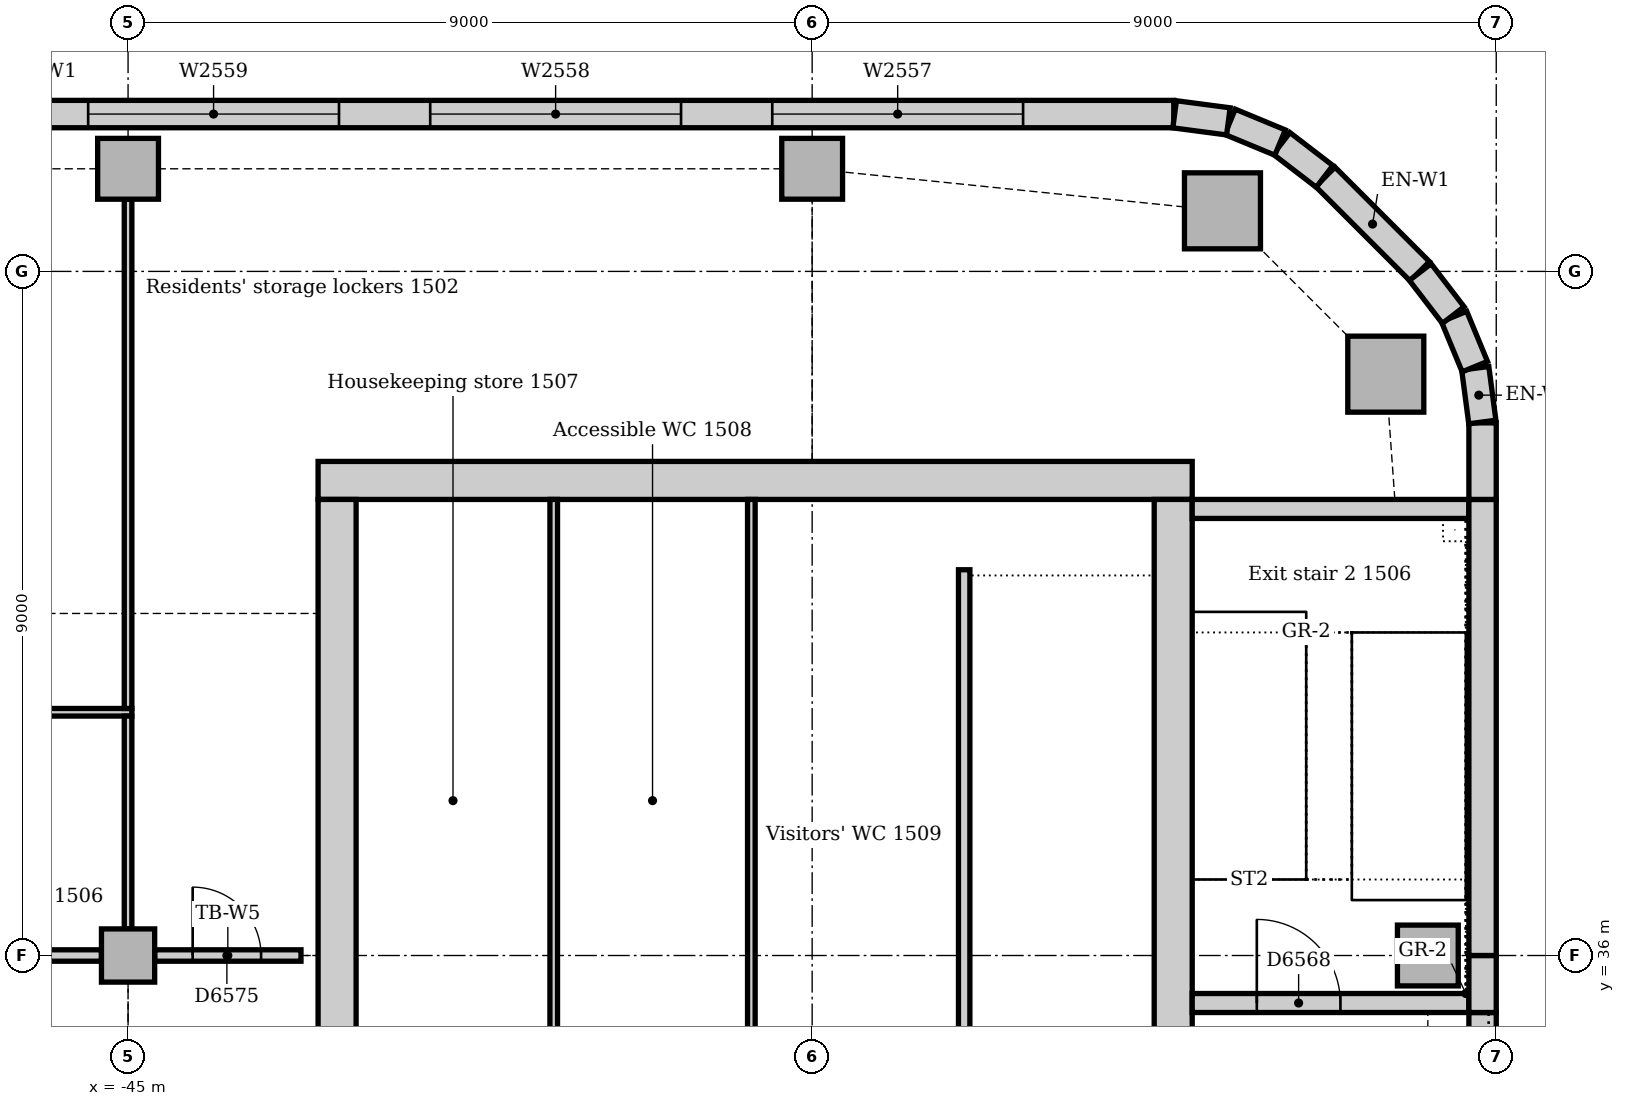
"""IFC4 building model, lengths in metres.
Left out: names, types, materials, properties, quantities, classifications, styles, units other than length and angle.
Written with IfcOpenShell. Run it as: python <this file> out.ifc"""

import sys

from ifc_helpers import new_model, si_unit, direction, frame, frame_2d, origin, origin_2d, place, context, subcontext, project, spatial, rectangle, extrude, element, fill, save


model = new_model("IFC4")
c1 = context("Model", 3, precision=1e-05, world=origin(), true_north=direction((0.0, 1.0)))
c2 = subcontext(c1, "Body", "Model", "MODEL_VIEW")
j1 = project(units=[si_unit("LENGTHUNIT", "METRE"), si_unit("PLANEANGLEUNIT", "RADIAN")], contexts=[c1])
p1 = place(None, origin())
s1 = spatial("IfcSite", under=j1, at=p1, CompositionType="ELEMENT")
p2 = place(p1, origin())
s2 = spatial("IfcBuilding", under=s1, at=p2, CompositionType="ELEMENT")
p3 = place(p2, frame((0.0, 0.0, 67.0)))
s3 = spatial("IfcBuildingStorey", under=s2, at=p3, CompositionType="ELEMENT", Elevation=67.0)
p4 = place(p3, frame((-31.0, 42.25, 0.0), z_axis=(0.0, 0.0, 1.0), x_axis=(-1.0, 0.0, 0.0)))
e1 = element("IfcWall", 1, at=p4, inside=s3, PredefinedType="SOLIDWALL", context=c2, shape_type="SweptSolid", body=[
    extrude(rectangle(XDim=11.5, YDim=0.5, at=frame_2d((5.75, 0.0))), origin(), (0.0, 0.0, 1.0), 4.0),
])
p5 = place(p3, frame((-31.25, 30.5, 0.0), z_axis=(0.0, 0.0, 1.0), x_axis=(0.0, 1.0, 0.0)))
e2 = element("IfcWall", 2, at=p5, inside=s3, PredefinedType="SOLIDWALL", context=c2, shape_type="SweptSolid", body=[
    extrude(rectangle(XDim=11.5, YDim=0.5, at=frame_2d((5.75, 0.0))), origin(), (0.0, 0.0, 1.0), 4.0),
])
p6 = place(p5, frame((0.85, 0.0, 0.0)))
e3 = element("IfcOpeningElement", 3, at=p6, cuts=e2, PredefinedType="OPENING", context=c2, shape_type="SweptSolid", body=[
    extrude(rectangle(XDim=1.8, YDim=2.1, at=frame_2d((0.9, 1.05))), frame((0.0, 0.26, 0.0), z_axis=(0.0, -1.0, 0.0), x_axis=(1.0, 0.0, 0.0)), (0.0, 0.0, 1.0), 0.52),
])
p7 = place(p3, frame((-42.25, 42.0, 0.0), z_axis=(0.0, 0.0, 1.0), x_axis=(0.0, -1.0, 0.0)))
e4 = element("IfcWall", 4, at=p7, inside=s3, PredefinedType="SOLIDWALL", context=c2, shape_type="SweptSolid", body=[
    extrude(rectangle(XDim=11.5, YDim=0.5, at=frame_2d((5.75, 0.0))), origin(), (0.0, 0.0, 1.0), 4.0),
])
p8 = place(p7, frame((8.85, 0.0, 0.0)))
e5 = element("IfcOpeningElement", 5, at=p8, cuts=e4, PredefinedType="OPENING", context=c2, shape_type="SweptSolid", body=[
    extrude(rectangle(XDim=1.8, YDim=2.1, at=frame_2d((0.9, 1.05))), frame((0.0, 0.26, 0.0), z_axis=(0.0, -1.0, 0.0), x_axis=(1.0, 0.0, 0.0)), (0.0, 0.0, 1.0), 0.52),
])
p9 = place(p3, frame((-31.0, 35.375, 0.0), z_axis=(0.0, 0.0, 1.0), x_axis=(1.0, 0.0, 0.0)))
e6 = element("IfcWall", 6, at=p9, inside=s3, PredefinedType="SOLIDWALL", context=c2, shape_type="SweptSolid", body=[
    extrude(rectangle(XDim=3.64, YDim=0.25, at=frame_2d((1.82, 0.0))), origin(), (0.0, 0.0, 1.0), 4.0),
])
p10 = place(p9, frame((0.85, 0.0, 0.0)))
e7 = element("IfcOpeningElement", 7, at=p10, cuts=e6, PredefinedType="OPENING", context=c2, shape_type="SweptSolid", body=[
    extrude(rectangle(XDim=1.1, YDim=2.1, at=frame_2d((0.55, 1.05))), frame((0.0, 0.135, 0.0), z_axis=(0.0, -1.0, 0.0), x_axis=(1.0, 0.0, 0.0)), (0.0, 0.0, 1.0), 0.27),
])
p11 = place(p3, frame((-27.36, 41.875, 0.0), z_axis=(0.0, 0.0, 1.0), x_axis=(-1.0, 0.0, 0.0)))
e8 = element("IfcWall", 8, at=p11, inside=s3, PredefinedType="SOLIDWALL", context=c2, shape_type="SweptSolid", body=[
    extrude(rectangle(XDim=3.64, YDim=0.25, at=frame_2d((1.82, 0.0))), origin(), (0.0, 0.0, 1.0), 4.0),
])
for number, where, z_axis, x_axis in (
    (9, (-28.453, 43.648, 0.0), (0.0, 0.0, 1.0), (1.0, 0.0, 0.0)),
    (10, (-30.602, 45.797, 0.0), (0.0, 0.0, 1.0), (1.0, 0.0, 0.0)),
):
    element("IfcColumn", number, at=place(p3, frame(where, z_axis=z_axis, x_axis=x_axis)), inside=s3, PredefinedType="COLUMN", context=c2, shape_type="SweptSolid", body=[
        extrude(rectangle(XDim=1.0, YDim=1.0, at=origin_2d()), origin(), (0.0, 0.0, 1.0), 3.85),
    ])
p12 = place(p3, frame((-27.9, 36.0, 0.0), z_axis=(0.0, 0.0, 1.0), x_axis=(1.0, 0.0, 0.0)))
e11 = element("IfcColumn", 11, at=p12, inside=s3, PredefinedType="COLUMN", context=c2, shape_type="SweptSolid", body=[
    extrude(rectangle(XDim=0.8, YDim=0.8, at=origin_2d()), origin(), (0.0, 0.0, 1.0), 4.0),
])
for number, where, z_axis, x_axis in (
    (12, (-45.0, 46.35, 0.0), (0.0, 0.0, 1.0), (1.0, 0.0, 0.0)),
    (13, (-36.0, 46.35, 0.0), (0.0, 0.0, 1.0), (1.0, 0.0, 0.0)),
):
    element("IfcColumn", number, at=place(p3, frame(where, z_axis=z_axis, x_axis=x_axis)), inside=s3, PredefinedType="COLUMN", context=c2, shape_type="SweptSolid", body=[
        extrude(rectangle(XDim=0.8, YDim=0.8, at=origin_2d()), origin(), (0.0, 0.0, 1.0), 3.85),
    ])
p13 = place(p3, frame((-45.0, 36.0, 0.0), z_axis=(0.0, 0.0, 1.0), x_axis=(1.0, 0.0, 0.0)))
e14 = element("IfcColumn", 14, at=p13, inside=s3, PredefinedType="COLUMN", context=c2, shape_type="SweptSolid", body=[
    extrude(rectangle(XDim=0.7, YDim=0.7, at=origin_2d()), origin(), (0.0, 0.0, 1.0), 3.85),
])
p14 = place(p3, frame((-27.18, 27.75, 0.0), z_axis=(0.0, 0.0, 1.0), x_axis=(0.0, 1.0, 0.0)))
e15 = element("IfcWall", 15, at=p14, inside=s3, PredefinedType="STANDARD", context=c2, shape_type="SweptSolid", body=[
    extrude(rectangle(XDim=7.5, YDim=0.36, at=frame_2d((3.75, 0.0))), origin(), (0.0, 0.0, 1.0), 3.436),
])
p15 = place(p14, frame((2.85, 0.0, 1.2)))
e16 = element("IfcOpeningElement", 16, at=p15, cuts=e15, PredefinedType="OPENING", context=c2, shape_type="SweptSolid", body=[
    extrude(rectangle(XDim=1.8, YDim=1.2, at=frame_2d((0.9, 0.6))), frame((0.0, 0.19, 0.0), z_axis=(0.0, -1.0, 0.0), x_axis=(1.0, 0.0, 0.0)), (0.0, 0.0, 1.0), 0.38),
])
p16 = place(p3, frame((-27.18, 35.25, 0.0), z_axis=(0.0, 0.0, 1.0), x_axis=(0.0, 1.0, 0.0)))
e17 = element("IfcWall", 17, at=p16, inside=s3, PredefinedType="STANDARD", context=c2, shape_type="SweptSolid", body=[
    extrude(rectangle(XDim=0.75, YDim=0.36, at=frame_2d((0.375, 0.0))), origin(), (0.0, 0.0, 1.0), 3.436),
])
p17 = place(p3, frame((-27.18, 36.0, 0.0), z_axis=(0.0, 0.0, 1.0), x_axis=(0.0, 1.0, 0.0)))
e18 = element("IfcWall", 18, at=p17, inside=s3, PredefinedType="STANDARD", context=c2, shape_type="SweptSolid", body=[
    extrude(rectangle(XDim=6.0, YDim=0.36, at=frame_2d((3.0, 0.0))), origin(), (0.0, 0.0, 1.0), 3.85),
])
p18 = place(p3, frame((-27.18, 42.0, 0.0), z_axis=(0.0, 0.0, 1.0), x_axis=(0.0, 1.0, 0.0)))
e19 = element("IfcWall", 19, at=p18, inside=s3, PredefinedType="STANDARD", context=c2, shape_type="SweptSolid", body=[
    extrude(rectangle(XDim=1.007, YDim=0.36, at=frame_2d((0.504, 0.0))), origin(), (0.0, 0.0, 1.0), 3.85),
])
p19 = place(p3, frame((-28.006, 45.001, 0.0), z_axis=(0.0, 0.0, 1.0), x_axis=(-0.707106781187, 0.707106781187, 0.0)))
e20 = element("IfcWall", 20, at=p19, inside=s3, PredefinedType="STANDARD", context=c2, shape_type="SweptSolid", body=[
    extrude(rectangle(XDim=1.757, YDim=0.36, at=frame_2d((0.879, 0.0))), origin(), (0.0, 0.0, 1.0), 3.85),
])
p20 = place(p3, frame((-31.243, 47.07, 0.0), z_axis=(0.0, 0.0, 1.0), x_axis=(-1.0, 0.0, 0.0)))
e21 = element("IfcWall", 21, at=p20, inside=s3, PredefinedType="STANDARD", context=c2, shape_type="SweptSolid", body=[
    extrude(rectangle(XDim=29.765, YDim=0.36, at=frame_2d((14.882, 0.0))), origin(), (0.0, 0.0, 1.0), 3.85),
])
p21 = place(p20, frame((1.982, 0.0, 0.9)))
e22 = element("IfcOpeningElement", 22, at=p21, cuts=e21, PredefinedType="OPENING", context=c2, shape_type="SweptSolid", body=[
    extrude(rectangle(XDim=3.3, YDim=1.6, at=frame_2d((1.65, 0.8))), frame((0.0, 0.19, 0.0), z_axis=(0.0, -1.0, 0.0), x_axis=(1.0, 0.0, 0.0)), (0.0, 0.0, 1.0), 0.38),
])
p22 = place(p20, frame((6.482, 0.0, 0.9)))
e23 = element("IfcOpeningElement", 23, at=p22, cuts=e21, PredefinedType="OPENING", context=c2, shape_type="SweptSolid", body=[
    extrude(rectangle(XDim=3.3, YDim=1.6, at=frame_2d((1.65, 0.8))), frame((0.0, 0.19, 0.0), z_axis=(0.0, -1.0, 0.0), x_axis=(1.0, 0.0, 0.0)), (0.0, 0.0, 1.0), 0.38),
])
p23 = place(p20, frame((10.982, 0.0, 0.9)))
e24 = element("IfcOpeningElement", 24, at=p23, cuts=e21, PredefinedType="OPENING", context=c2, shape_type="SweptSolid", body=[
    extrude(rectangle(XDim=3.3, YDim=1.6, at=frame_2d((1.65, 0.8))), frame((0.0, 0.19, 0.0), z_axis=(0.0, -1.0, 0.0), x_axis=(1.0, 0.0, 0.0)), (0.0, 0.0, 1.0), 0.38),
])
p24 = place(p20, frame((15.482, 0.0, 0.9)))
e25 = element("IfcOpeningElement", 25, at=p24, cuts=e21, PredefinedType="OPENING", context=c2, shape_type="SweptSolid", body=[
    extrude(rectangle(XDim=3.3, YDim=1.6, at=frame_2d((1.65, 0.8))), frame((0.0, 0.19, 0.0), z_axis=(0.0, -1.0, 0.0), x_axis=(1.0, 0.0, 0.0)), (0.0, 0.0, 1.0), 0.38),
])
p25 = place(p20, frame((19.982, 0.0, 0.9)))
e26 = element("IfcOpeningElement", 26, at=p25, cuts=e21, PredefinedType="OPENING", context=c2, shape_type="SweptSolid", body=[
    extrude(rectangle(XDim=3.3, YDim=1.6, at=frame_2d((1.65, 0.8))), frame((0.0, 0.19, 0.0), z_axis=(0.0, -1.0, 0.0), x_axis=(1.0, 0.0, 0.0)), (0.0, 0.0, 1.0), 0.38),
])
p26 = place(p20, frame((24.482, 0.0, 0.9)))
e27 = element("IfcOpeningElement", 27, at=p26, cuts=e21, PredefinedType="OPENING", context=c2, shape_type="SweptSolid", body=[
    extrude(rectangle(XDim=3.3, YDim=1.6, at=frame_2d((1.65, 0.8))), frame((0.0, 0.19, 0.0), z_axis=(0.0, -1.0, 0.0), x_axis=(1.0, 0.0, 0.0)), (0.0, 0.0, 1.0), 0.38),
])
for number, where, z_axis, x_axis in (
    (28, (-27.183, 43.019, 0.0), (0.0, 0.0, 1.0), (-0.131, 0.991, 0.0)),
    (29, (-27.282, 43.747, 0.0), (0.0, 0.0, 1.0), (-0.383, 0.924, 0.0)),
):
    element("IfcWall", number, at=place(p3, frame(where, z_axis=z_axis, x_axis=x_axis)), inside=s3, PredefinedType="STANDARD", context=c2, shape_type="SweptSolid", body=[
        extrude(rectangle(XDim=0.713, YDim=0.36, at=frame_2d((0.356, 0.0))), origin(), (0.0, 0.0, 1.0), 3.85),
    ])
for number, where, z_axis, x_axis in (
    (30, (-27.566, 44.425, 0.0), (0.0, 0.0, 1.0), (-0.609, 0.793, 0.0)),
    (31, (-29.259, 46.25, 0.0), (0.0, 0.0, 1.0), (-0.793, 0.609, 0.0)),
):
    element("IfcWall", number, at=place(p3, frame(where, z_axis=z_axis, x_axis=x_axis)), inside=s3, PredefinedType="STANDARD", context=c2, shape_type="SweptSolid", body=[
        extrude(rectangle(XDim=0.713, YDim=0.36, at=frame_2d((0.357, 0.0))), origin(), (0.0, 0.0, 1.0), 3.85),
    ])
for number, where, z_axis, x_axis in (
    (32, (-29.844, 46.695, 0.0), (0.0, 0.0, 1.0), (-0.924, 0.383, 0.0)),
    (33, (-30.524, 46.974, 0.0), (0.0, 0.0, 1.0), (-0.991, 0.131, 0.0)),
):
    element("IfcWall", number, at=place(p3, frame(where, z_axis=z_axis, x_axis=x_axis)), inside=s3, PredefinedType="STANDARD", context=c2, shape_type="SweptSolid", body=[
        extrude(rectangle(XDim=0.713, YDim=0.36, at=frame_2d((0.356, 0.0))), origin(), (0.0, 0.0, 1.0), 3.85),
    ])
p27 = place(p3, frame((-34.0, 41.075, 0.0), z_axis=(0.0, 0.0, 1.0), x_axis=(0.0, -1.0, 0.0)))
e34 = element("IfcWall", 34, at=p27, inside=s3, PredefinedType="SOLIDWALL", context=c2, shape_type="SweptSolid", body=[
    extrude(rectangle(XDim=7.0, YDim=0.15, at=frame_2d((3.5, 0.0))), origin(), (0.0, 0.0, 1.0), 4.0),
])
for number, where, z_axis, x_axis in (
    (35, (-39.4, 34.075, 0.0), (0.0, 0.0, 1.0), (0.0, 1.0, 0.0)),
    (36, (-36.8, 34.075, 0.0), (0.0, 0.0, 1.0), (0.0, 1.0, 0.0)),
):
    element("IfcWall", number, at=place(p3, frame(where, z_axis=z_axis, x_axis=x_axis)), inside=s3, PredefinedType="PARTITIONING", context=c2, shape_type="SweptSolid", body=[
        extrude(rectangle(XDim=7.925, YDim=0.1, at=frame_2d((3.962, 0.0))), origin(), (0.0, 0.0, 1.0), 3.85),
    ])
p28 = place(p3, frame((-44.65, 36.0, 0.0), z_axis=(0.0, 0.0, 1.0), x_axis=(1.0, 0.0, 0.0)))
e37 = element("IfcWall", 37, at=p28, inside=s3, PredefinedType="PARTITIONING", context=c2, shape_type="SweptSolid", body=[
    extrude(rectangle(XDim=1.925, YDim=0.15, at=frame_2d((0.963, 0.0))), origin(), (0.0, 0.0, 1.0), 3.602),
])
p29 = place(p28, frame((0.5, 0.0, 0.0)))
e38 = element("IfcOpeningElement", 38, at=p29, cuts=e37, PredefinedType="OPENING", context=c2, shape_type="SweptSolid", body=[
    extrude(rectangle(XDim=0.9, YDim=2.1, at=frame_2d((0.45, 1.05))), frame((0.0, 0.085, 0.0), z_axis=(0.0, -1.0, 0.0), x_axis=(1.0, 0.0, 0.0)), (0.0, 0.0, 1.0), 0.17),
])
p30 = place(p3, frame((-53.65, 36.0, 0.0), z_axis=(0.0, 0.0, 1.0), x_axis=(1.0, 0.0, 0.0)))
e39 = element("IfcWall", 39, at=p30, inside=s3, PredefinedType="PARTITIONING", context=c2, shape_type="SweptSolid", body=[
    extrude(rectangle(XDim=8.3, YDim=0.15, at=frame_2d((4.15, 0.0))), origin(), (0.0, 0.0, 1.0), 3.158),
])
p31 = place(p30, frame((4.7, 0.0, 0.0)))
e40 = element("IfcOpeningElement", 40, at=p31, cuts=e39, PredefinedType="OPENING", context=c2, shape_type="SweptSolid", body=[
    extrude(rectangle(XDim=1.0, YDim=2.1, at=frame_2d((0.5, 1.05))), frame((0.0, 0.085, 0.0), z_axis=(0.0, -1.0, 0.0), x_axis=(1.0, 0.0, 0.0)), (0.0, 0.0, 1.0), 0.17),
])
p32 = place(p3, frame((-50.925, 39.2, 0.0), z_axis=(0.0, 0.0, 1.0), x_axis=(1.0, 0.0, 0.0)))
e41 = element("IfcWall", 41, at=p32, inside=s3, PredefinedType="PARTITIONING", context=c2, shape_type="SweptSolid", body=[
    extrude(rectangle(XDim=5.975, YDim=0.1, at=frame_2d((2.987, 0.0))), origin(), (0.0, 0.0, 1.0), 3.85),
])
p33 = place(p32, frame((2.025, 0.0, 0.0)))
e42 = element("IfcOpeningElement", 42, at=p33, cuts=e41, PredefinedType="OPENING", context=c2, shape_type="SweptSolid", body=[
    extrude(rectangle(XDim=0.9, YDim=2.1, at=frame_2d((0.45, 1.05))), frame((0.0, 0.06, 0.0), z_axis=(0.0, -1.0, 0.0), x_axis=(1.0, 0.0, 0.0)), (0.0, 0.0, 1.0), 0.12),
])
p34 = place(p3, frame((-45.0, 39.25, 0.0), z_axis=(0.0, 0.0, 1.0), x_axis=(0.0, 1.0, 0.0)))
e43 = element("IfcWall", 43, at=p34, inside=s3, PredefinedType="PARTITIONING", context=c2, shape_type="SweptSolid", body=[
    extrude(rectangle(XDim=6.7, YDim=0.1, at=frame_2d((3.35, 0.0))), origin(), (0.0, 0.0, 1.0), 3.256),
])
p35 = place(p3, frame((-45.0, 36.35, 0.0), z_axis=(0.0, 0.0, 1.0), x_axis=(0.0, 1.0, 0.0)))
e44 = element("IfcWall", 44, at=p35, inside=s3, PredefinedType="PARTITIONING", context=c2, shape_type="SweptSolid", body=[
    extrude(rectangle(XDim=2.8, YDim=0.1, at=frame_2d((1.4, 0.0))), origin(), (0.0, 0.0, 1.0), 3.256),
])
p36 = place(p21, origin())
e45 = element("IfcWindow", 45, at=p36, inside=s3, PartitioningType="SINGLE_PANEL", PredefinedType="WINDOW", context=c2, shape_type="SweptSolid", body=[
    extrude(rectangle(XDim=3.3, YDim=1.6, at=frame_2d((1.65, 0.8))), frame((0.0, 0.13, 0.0), z_axis=(0.0, -1.0, 0.0), x_axis=(1.0, 0.0, 0.0)), (0.0, 0.0, 1.0), 0.06),
])
fill(e22, e45)
p37 = place(p22, origin())
e46 = element("IfcWindow", 46, at=p37, inside=s3, PartitioningType="SINGLE_PANEL", PredefinedType="WINDOW", context=c2, shape_type="SweptSolid", body=[
    extrude(rectangle(XDim=3.3, YDim=1.6, at=frame_2d((1.65, 0.8))), frame((0.0, 0.13, 0.0), z_axis=(0.0, -1.0, 0.0), x_axis=(1.0, 0.0, 0.0)), (0.0, 0.0, 1.0), 0.06),
])
fill(e23, e46)
p38 = place(p23, origin())
e47 = element("IfcWindow", 47, at=p38, inside=s3, PartitioningType="SINGLE_PANEL", PredefinedType="WINDOW", context=c2, shape_type="SweptSolid", body=[
    extrude(rectangle(XDim=3.3, YDim=1.6, at=frame_2d((1.65, 0.8))), frame((0.0, 0.13, 0.0), z_axis=(0.0, -1.0, 0.0), x_axis=(1.0, 0.0, 0.0)), (0.0, 0.0, 1.0), 0.06),
])
fill(e24, e47)
p39 = place(p10, origin())
e48 = element("IfcDoor", 48, at=p39, inside=s3, OperationType="SINGLE_SWING_LEFT", PredefinedType="DOOR", context=c2, shape_type="SweptSolid", body=[
    extrude(rectangle(XDim=1.1, YDim=2.1, at=frame_2d((0.55, 1.05))), frame((0.0, 0.025, 0.0), z_axis=(0.0, -1.0, 0.0), x_axis=(1.0, 0.0, 0.0)), (0.0, 0.0, 1.0), 0.05),
])
fill(e7, e48)
p40 = place(p29, origin())
e49 = element("IfcDoor", 49, at=p40, inside=s3, OperationType="SINGLE_SWING_LEFT", PredefinedType="DOOR", context=c2, shape_type="SweptSolid", body=[
    extrude(rectangle(XDim=0.9, YDim=2.1, at=frame_2d((0.45, 1.05))), frame((0.0, 0.025, 0.0), z_axis=(0.0, -1.0, 0.0), x_axis=(1.0, 0.0, 0.0)), (0.0, 0.0, 1.0), 0.05),
])
fill(e38, e49)
save(model, sys.argv[1])
